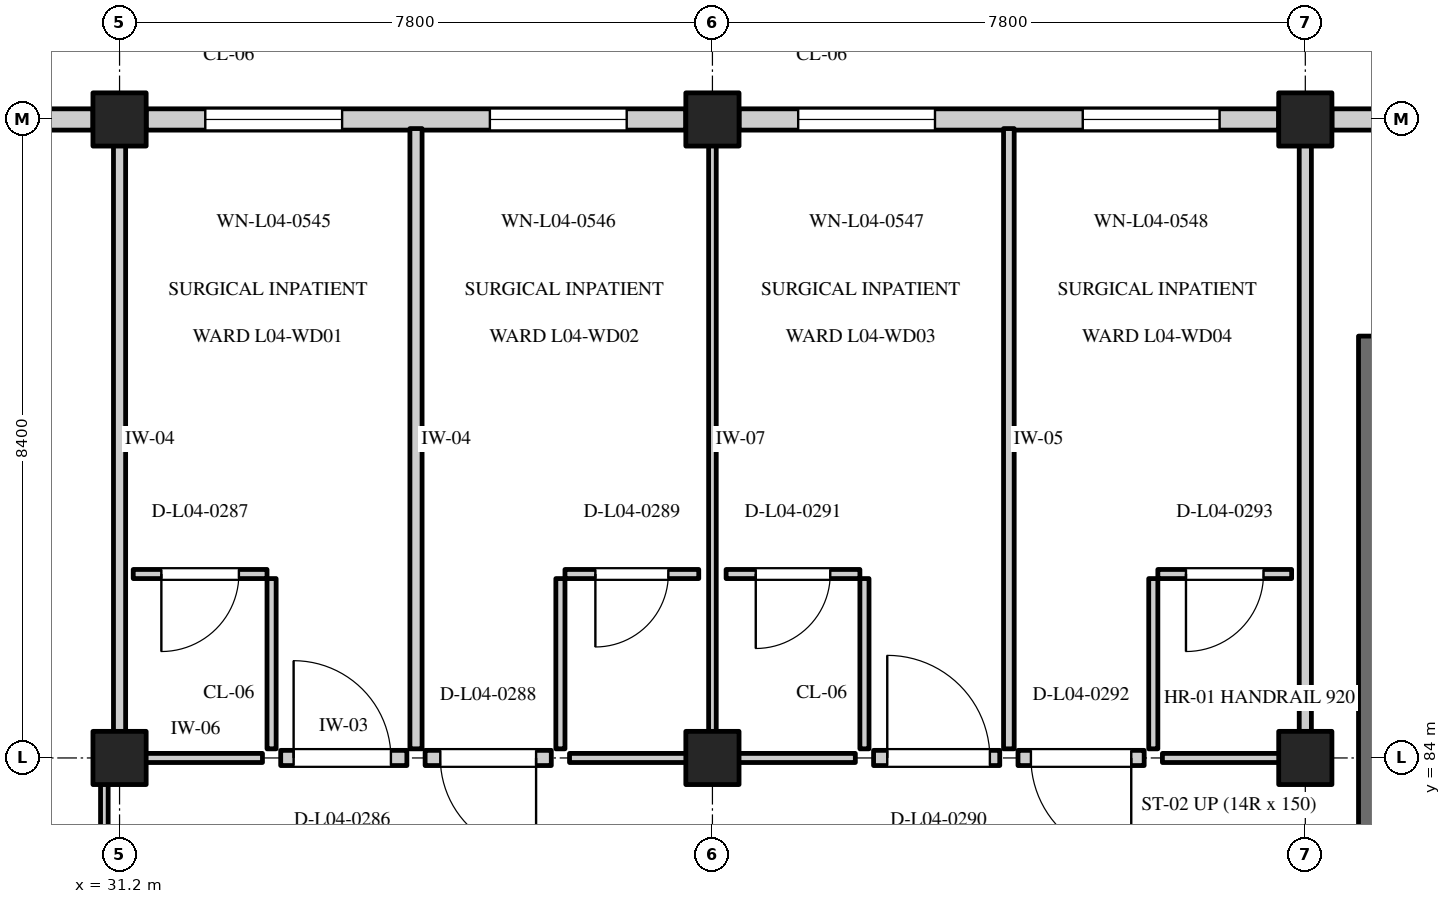
"""IFC4 building model, lengths in metres.
Left out: names, types, materials, properties, quantities, classifications, styles, units other than length and angle.
Written with IfcOpenShell. Run it as: python <this file> out.ifc"""

import sys

from ifc_helpers import new_model, si_unit, direction, frame, frame_2d, origin, origin_2d, place, context, subcontext, project, spatial, rectangle, extrude, element, fill, save


model = new_model("IFC4")
c1 = context("Model", 3, precision=1e-05, world=origin(), true_north=direction((0.0, 1.0)))
c2 = subcontext(c1, "Body", "Model", "MODEL_VIEW")
j1 = project(units=[si_unit("LENGTHUNIT", "METRE"), si_unit("PLANEANGLEUNIT", "RADIAN")], contexts=[c1])
p1 = place(None, origin())
s1 = spatial("IfcSite", under=j1, at=p1, CompositionType="ELEMENT")
p2 = place(p1, origin())
s2 = spatial("IfcBuilding", under=s1, at=p2, CompositionType="ELEMENT")
p3 = place(p2, frame((0.0, 0.0, 18.0)))
s3 = spatial("IfcBuildingStorey", under=s2, at=p3, CompositionType="ELEMENT", Elevation=18.0)
for number, where, z_axis, x_axis in (
    (1, (31.2, 84.0, 0.0), (0.0, 0.0, 1.0), (1.0, 0.0, 0.0)),
    (2, (31.2, 92.4, 0.0), (0.0, 0.0, 1.0), (1.0, 0.0, 0.0)),
    (3, (39.0, 84.0, 0.0), (0.0, 0.0, 1.0), (1.0, 0.0, 0.0)),
    (4, (39.0, 92.4, 0.0), (0.0, 0.0, 1.0), (1.0, 0.0, 0.0)),
    (5, (46.8, 84.0, 0.0), (0.0, 0.0, 1.0), (1.0, 0.0, 0.0)),
    (6, (46.8, 92.4, 0.0), (0.0, 0.0, 1.0), (1.0, 0.0, 0.0)),
):
    element("IfcColumn", number, at=place(p3, frame(where, z_axis=z_axis, x_axis=x_axis)), inside=s3, PredefinedType="COLUMN", context=c2, shape_type="SweptSolid", body=[
        extrude(rectangle(XDim=0.7, YDim=0.7, at=origin_2d()), origin(), (0.0, 0.0, 1.0), 4.2),
    ])
p4 = place(p3, frame((23.775, 92.4, 0.0), z_axis=(0.0, 0.0, 1.0), x_axis=(1.0, 0.0, 0.0)))
e7 = element("IfcWall", 7, at=p4, inside=s3, PredefinedType="STANDARD", context=c2, shape_type="SweptSolid", body=[
    extrude(rectangle(XDim=7.075, YDim=0.28, at=frame_2d((3.538, 0.0))), origin(), (0.0, 0.0, 1.0), 3.335),
])
p5 = place(p4, frame((0.653, 0.0, 0.8)))
e8 = element("IfcOpeningElement", 8, at=p5, cuts=e7, PredefinedType="OPENING", context=c2, shape_type="SweptSolid", body=[
    extrude(rectangle(XDim=2.0, YDim=1.45, at=frame_2d((1.0, 0.725))), frame((0.0, 0.152, 0.0), z_axis=(0.0, -1.0, 0.0), x_axis=(1.0, 0.0, 0.0)), (0.0, 0.0, 1.0), 0.304),
])
p6 = place(p4, frame((4.397, 0.0, 0.8)))
e9 = element("IfcOpeningElement", 9, at=p6, cuts=e7, PredefinedType="OPENING", context=c2, shape_type="SweptSolid", body=[
    extrude(rectangle(XDim=2.0, YDim=1.45, at=frame_2d((1.0, 0.725))), frame((0.0, 0.152, 0.0), z_axis=(0.0, -1.0, 0.0), x_axis=(1.0, 0.0, 0.0)), (0.0, 0.0, 1.0), 0.304),
])
p7 = place(p3, frame((31.55, 92.4, 0.0), z_axis=(0.0, 0.0, 1.0), x_axis=(1.0, 0.0, 0.0)))
e10 = element("IfcWall", 10, at=p7, inside=s3, PredefinedType="STANDARD", context=c2, shape_type="SweptSolid", body=[
    extrude(rectangle(XDim=7.1, YDim=0.28, at=frame_2d((3.55, 0.0))), origin(), (0.0, 0.0, 1.0), 3.335),
])
p8 = place(p7, frame((0.778, 0.0, 0.8)))
e11 = element("IfcOpeningElement", 11, at=p8, cuts=e10, PredefinedType="OPENING", context=c2, shape_type="SweptSolid", body=[
    extrude(rectangle(XDim=1.8, YDim=1.75, at=frame_2d((0.9, 0.875))), frame((0.0, 0.152, 0.0), z_axis=(0.0, -1.0, 0.0), x_axis=(1.0, 0.0, 0.0)), (0.0, 0.0, 1.0), 0.304),
])
p9 = place(p7, frame((4.522, 0.0, 0.8)))
e12 = element("IfcOpeningElement", 12, at=p9, cuts=e10, PredefinedType="OPENING", context=c2, shape_type="SweptSolid", body=[
    extrude(rectangle(XDim=1.8, YDim=1.75, at=frame_2d((0.9, 0.875))), frame((0.0, 0.152, 0.0), z_axis=(0.0, -1.0, 0.0), x_axis=(1.0, 0.0, 0.0)), (0.0, 0.0, 1.0), 0.304),
])
p10 = place(p3, frame((39.35, 92.4, 0.0), z_axis=(0.0, 0.0, 1.0), x_axis=(1.0, 0.0, 0.0)))
e13 = element("IfcWall", 13, at=p10, inside=s3, PredefinedType="STANDARD", context=c2, shape_type="SweptSolid", body=[
    extrude(rectangle(XDim=7.1, YDim=0.28, at=frame_2d((3.55, 0.0))), origin(), (0.0, 0.0, 1.0), 3.335),
])
p11 = place(p10, frame((0.778, 0.0, 0.8)))
e14 = element("IfcOpeningElement", 14, at=p11, cuts=e13, PredefinedType="OPENING", context=c2, shape_type="SweptSolid", body=[
    extrude(rectangle(XDim=1.8, YDim=1.65, at=frame_2d((0.9, 0.825))), frame((0.0, 0.152, 0.0), z_axis=(0.0, -1.0, 0.0), x_axis=(1.0, 0.0, 0.0)), (0.0, 0.0, 1.0), 0.304),
])
p12 = place(p10, frame((4.522, 0.0, 0.8)))
e15 = element("IfcOpeningElement", 15, at=p12, cuts=e13, PredefinedType="OPENING", context=c2, shape_type="SweptSolid", body=[
    extrude(rectangle(XDim=1.8, YDim=1.65, at=frame_2d((0.9, 0.825))), frame((0.0, 0.152, 0.0), z_axis=(0.0, -1.0, 0.0), x_axis=(1.0, 0.0, 0.0)), (0.0, 0.0, 1.0), 0.304),
])
p13 = place(p3, frame((47.15, 92.4, 0.0), z_axis=(0.0, 0.0, 1.0), x_axis=(1.0, 0.0, 0.0)))
e16 = element("IfcWall", 16, at=p13, inside=s3, PredefinedType="STANDARD", context=c2, shape_type="SweptSolid", body=[
    extrude(rectangle(XDim=7.075, YDim=0.28, at=frame_2d((3.538, 0.0))), origin(), (0.0, 0.0, 1.0), 3.335),
])
p14 = place(p13, frame((0.778, 0.0, 0.8)))
e17 = element("IfcOpeningElement", 17, at=p14, cuts=e16, PredefinedType="OPENING", context=c2, shape_type="SweptSolid", body=[
    extrude(rectangle(XDim=1.8, YDim=1.55, at=frame_2d((0.9, 0.775))), frame((0.0, 0.152, 0.0), z_axis=(0.0, -1.0, 0.0), x_axis=(1.0, 0.0, 0.0)), (0.0, 0.0, 1.0), 0.304),
])
p15 = place(p13, frame((4.522, 0.0, 0.8)))
e18 = element("IfcOpeningElement", 18, at=p15, cuts=e16, PredefinedType="OPENING", context=c2, shape_type="SweptSolid", body=[
    extrude(rectangle(XDim=1.8, YDim=1.55, at=frame_2d((0.9, 0.775))), frame((0.0, 0.152, 0.0), z_axis=(0.0, -1.0, 0.0), x_axis=(1.0, 0.0, 0.0)), (0.0, 0.0, 1.0), 0.304),
])
p16 = place(p3, frame((47.675, 79.05, 0.0), z_axis=(0.0, 0.0, 1.0), x_axis=(0.0, 1.0, 0.0)))
e19 = element("IfcWall", 19, at=p16, inside=s3, PredefinedType="SHEAR", context=c2, shape_type="SweptSolid", body=[
    extrude(rectangle(XDim=10.5, YDim=0.35, at=frame_2d((5.25, 0.0))), origin(), (0.0, 0.0, 1.0), 4.2),
])
for number, where, z_axis, x_axis in (
    (20, (31.2, 84.12, 0.0), (0.0, 0.0, 1.0), (0.0, 1.0, 0.0)),
    (21, (35.1, 84.12, 0.0), (0.0, 0.0, 1.0), (0.0, 1.0, 0.0)),
):
    element("IfcWall", number, at=place(p3, frame(where, z_axis=z_axis, x_axis=x_axis)), inside=s3, PredefinedType="PARTITIONING", context=c2, shape_type="SweptSolid", body=[
        extrude(rectangle(XDim=8.16, YDim=0.16, at=frame_2d((4.08, 0.0))), origin(), (0.0, 0.0, 1.0), 3.865),
    ])
p17 = place(p3, frame((33.32, 84.0, 0.0), z_axis=(0.0, 0.0, 1.0), x_axis=(1.0, 0.0, 0.0)))
e22 = element("IfcWall", 22, at=p17, inside=s3, PredefinedType="STANDARD", context=c2, shape_type="SweptSolid", body=[
    extrude(rectangle(XDim=1.66, YDim=0.2, at=frame_2d((0.83, 0.0))), origin(), (0.0, 0.0, 1.0), 3.235),
])
p18 = place(p17, frame((0.17, 0.0, 0.0)))
e23 = element("IfcOpeningElement", 23, at=p18, cuts=e22, PredefinedType="OPENING", context=c2, shape_type="SweptSolid", body=[
    extrude(rectangle(XDim=1.28, YDim=2.15, at=frame_2d((0.64, 1.075))), frame((0.0, 0.112, 0.0), z_axis=(0.0, -1.0, 0.0), x_axis=(1.0, 0.0, 0.0)), (0.0, 0.0, 1.0), 0.224),
])
p19 = place(p3, frame((31.32, 84.0, 0.0), z_axis=(0.0, 0.0, 1.0), x_axis=(1.0, 0.0, 0.0)))
e24 = element("IfcWall", 24, at=p19, inside=s3, PredefinedType="PARTITIONING", context=c2, shape_type="SweptSolid", body=[
    extrude(rectangle(XDim=1.76, YDim=0.12, at=frame_2d((0.88, 0.0))), origin(), (0.0, 0.0, 1.0), 3.235),
])
p20 = place(p3, frame((33.2, 84.12, 0.0), z_axis=(0.0, 0.0, 1.0), x_axis=(0.0, 1.0, 0.0)))
e25 = element("IfcWall", 25, at=p20, inside=s3, PredefinedType="PARTITIONING", context=c2, shape_type="SweptSolid", body=[
    extrude(rectangle(XDim=2.24, YDim=0.12, at=frame_2d((1.12, 0.0))), origin(), (0.0, 0.0, 1.0), 3.865),
])
p21 = place(p3, frame((31.38, 86.42, 0.0), z_axis=(0.0, 0.0, 1.0), x_axis=(1.0, 0.0, 0.0)))
e26 = element("IfcWall", 26, at=p21, inside=s3, PredefinedType="PARTITIONING", context=c2, shape_type="SweptSolid", body=[
    extrude(rectangle(XDim=1.76, YDim=0.12, at=frame_2d((0.88, 0.0))), origin(), (0.0, 0.0, 1.0), 3.865),
])
p22 = place(p21, frame((0.37, 0.0, 0.0)))
e27 = element("IfcOpeningElement", 27, at=p22, cuts=e26, PredefinedType="OPENING", context=c2, shape_type="SweptSolid", body=[
    extrude(rectangle(XDim=1.02, YDim=2.15, at=frame_2d((0.51, 1.075))), frame((0.0, 0.072, 0.0), z_axis=(0.0, -1.0, 0.0), x_axis=(1.0, 0.0, 0.0)), (0.0, 0.0, 1.0), 0.144),
])
p23 = place(p3, frame((39.0, 84.12, 0.0), z_axis=(0.0, 0.0, 1.0), x_axis=(0.0, 1.0, 0.0)))
e28 = element("IfcWall", 28, at=p23, inside=s3, PredefinedType="PARTITIONING", context=c2, shape_type="SweptSolid", body=[
    extrude(rectangle(XDim=8.16, YDim=0.1, at=frame_2d((4.08, 0.0))), origin(), (0.0, 0.0, 1.0), 3.235),
])
p24 = place(p3, frame((35.22, 84.0, 0.0), z_axis=(0.0, 0.0, 1.0), x_axis=(1.0, 0.0, 0.0)))
e29 = element("IfcWall", 29, at=p24, inside=s3, PredefinedType="STANDARD", context=c2, shape_type="SweptSolid", body=[
    extrude(rectangle(XDim=1.66, YDim=0.2, at=frame_2d((0.83, 0.0))), origin(), (0.0, 0.0, 1.0), 3.235),
])
p25 = place(p24, frame((0.2, 0.0, 0.0)))
e30 = element("IfcOpeningElement", 30, at=p25, cuts=e29, PredefinedType="OPENING", context=c2, shape_type="SweptSolid", body=[
    extrude(rectangle(XDim=1.26, YDim=2.1, at=frame_2d((0.63, 1.05))), frame((0.0, 0.112, 0.0), z_axis=(0.0, -1.0, 0.0), x_axis=(1.0, 0.0, 0.0)), (0.0, 0.0, 1.0), 0.224),
])
p26 = place(p3, frame((37.12, 84.0, 0.0), z_axis=(0.0, 0.0, 1.0), x_axis=(1.0, 0.0, 0.0)))
e31 = element("IfcWall", 31, at=p26, inside=s3, PredefinedType="PARTITIONING", context=c2, shape_type="SweptSolid", body=[
    extrude(rectangle(XDim=1.76, YDim=0.12, at=frame_2d((0.88, 0.0))), origin(), (0.0, 0.0, 1.0), 3.235),
])
p27 = place(p3, frame((37.0, 84.12, 0.0), z_axis=(0.0, 0.0, 1.0), x_axis=(0.0, 1.0, 0.0)))
e32 = element("IfcWall", 32, at=p27, inside=s3, PredefinedType="PARTITIONING", context=c2, shape_type="SweptSolid", body=[
    extrude(rectangle(XDim=2.24, YDim=0.12, at=frame_2d((1.12, 0.0))), origin(), (0.0, 0.0, 1.0), 3.865),
])
p28 = place(p3, frame((37.06, 86.42, 0.0), z_axis=(0.0, 0.0, 1.0), x_axis=(1.0, 0.0, 0.0)))
e33 = element("IfcWall", 33, at=p28, inside=s3, PredefinedType="PARTITIONING", context=c2, shape_type="SweptSolid", body=[
    extrude(rectangle(XDim=1.76, YDim=0.12, at=frame_2d((0.88, 0.0))), origin(), (0.0, 0.0, 1.0), 3.865),
])
p29 = place(p28, frame((0.4, 0.0, 0.0)))
e34 = element("IfcOpeningElement", 34, at=p29, cuts=e33, PredefinedType="OPENING", context=c2, shape_type="SweptSolid", body=[
    extrude(rectangle(XDim=0.96, YDim=2.12, at=frame_2d((0.48, 1.06))), frame((0.0, 0.072, 0.0), z_axis=(0.0, -1.0, 0.0), x_axis=(1.0, 0.0, 0.0)), (0.0, 0.0, 1.0), 0.144),
])
p30 = place(p3, frame((42.9, 84.12, 0.0), z_axis=(0.0, 0.0, 1.0), x_axis=(0.0, 1.0, 0.0)))
e35 = element("IfcWall", 35, at=p30, inside=s3, PredefinedType="PARTITIONING", context=c2, shape_type="SweptSolid", body=[
    extrude(rectangle(XDim=8.16, YDim=0.14, at=frame_2d((4.08, 0.0))), origin(), (0.0, 0.0, 1.0), 3.865),
])
p31 = place(p3, frame((41.12, 84.0, 0.0), z_axis=(0.0, 0.0, 1.0), x_axis=(1.0, 0.0, 0.0)))
e36 = element("IfcWall", 36, at=p31, inside=s3, PredefinedType="STANDARD", context=c2, shape_type="SweptSolid", body=[
    extrude(rectangle(XDim=1.66, YDim=0.2, at=frame_2d((0.83, 0.0))), origin(), (0.0, 0.0, 1.0), 3.235),
])
p32 = place(p31, frame((0.18, 0.0, 0.0)))
e37 = element("IfcOpeningElement", 37, at=p32, cuts=e36, PredefinedType="OPENING", context=c2, shape_type="SweptSolid", body=[
    extrude(rectangle(XDim=1.35, YDim=2.15, at=frame_2d((0.675, 1.075))), frame((0.0, 0.112, 0.0), z_axis=(0.0, -1.0, 0.0), x_axis=(1.0, 0.0, 0.0)), (0.0, 0.0, 1.0), 0.224),
])
p33 = place(p3, frame((39.12, 84.0, 0.0), z_axis=(0.0, 0.0, 1.0), x_axis=(1.0, 0.0, 0.0)))
e38 = element("IfcWall", 38, at=p33, inside=s3, PredefinedType="PARTITIONING", context=c2, shape_type="SweptSolid", body=[
    extrude(rectangle(XDim=1.76, YDim=0.12, at=frame_2d((0.88, 0.0))), origin(), (0.0, 0.0, 1.0), 3.235),
])
p34 = place(p3, frame((41.0, 84.12, 0.0), z_axis=(0.0, 0.0, 1.0), x_axis=(0.0, 1.0, 0.0)))
e39 = element("IfcWall", 39, at=p34, inside=s3, PredefinedType="PARTITIONING", context=c2, shape_type="SweptSolid", body=[
    extrude(rectangle(XDim=2.24, YDim=0.12, at=frame_2d((1.12, 0.0))), origin(), (0.0, 0.0, 1.0), 3.865),
])
p35 = place(p3, frame((39.18, 86.42, 0.0), z_axis=(0.0, 0.0, 1.0), x_axis=(1.0, 0.0, 0.0)))
e40 = element("IfcWall", 40, at=p35, inside=s3, PredefinedType="PARTITIONING", context=c2, shape_type="SweptSolid", body=[
    extrude(rectangle(XDim=1.76, YDim=0.12, at=frame_2d((0.88, 0.0))), origin(), (0.0, 0.0, 1.0), 3.865),
])
p36 = place(p35, frame((0.39, 0.0, 0.0)))
e41 = element("IfcOpeningElement", 41, at=p36, cuts=e40, PredefinedType="OPENING", context=c2, shape_type="SweptSolid", body=[
    extrude(rectangle(XDim=0.98, YDim=2.1, at=frame_2d((0.49, 1.05))), frame((0.0, 0.072, 0.0), z_axis=(0.0, -1.0, 0.0), x_axis=(1.0, 0.0, 0.0)), (0.0, 0.0, 1.0), 0.144),
])
p37 = place(p3, frame((46.8, 84.12, 0.0), z_axis=(0.0, 0.0, 1.0), x_axis=(0.0, 1.0, 0.0)))
e42 = element("IfcWall", 42, at=p37, inside=s3, PredefinedType="PARTITIONING", context=c2, shape_type="SweptSolid", body=[
    extrude(rectangle(XDim=8.16, YDim=0.16, at=frame_2d((4.08, 0.0))), origin(), (0.0, 0.0, 1.0), 3.865),
])
p38 = place(p3, frame((43.02, 84.0, 0.0), z_axis=(0.0, 0.0, 1.0), x_axis=(1.0, 0.0, 0.0)))
e43 = element("IfcWall", 43, at=p38, inside=s3, PredefinedType="STANDARD", context=c2, shape_type="SweptSolid", body=[
    extrude(rectangle(XDim=1.66, YDim=0.2, at=frame_2d((0.83, 0.0))), origin(), (0.0, 0.0, 1.0), 3.235),
])
p39 = place(p38, frame((0.17, 0.0, 0.0)))
e44 = element("IfcOpeningElement", 44, at=p39, cuts=e43, PredefinedType="OPENING", context=c2, shape_type="SweptSolid", body=[
    extrude(rectangle(XDim=1.32, YDim=2.2, at=frame_2d((0.66, 1.1))), frame((0.0, 0.112, 0.0), z_axis=(0.0, -1.0, 0.0), x_axis=(1.0, 0.0, 0.0)), (0.0, 0.0, 1.0), 0.224),
])
p40 = place(p3, frame((44.92, 84.0, 0.0), z_axis=(0.0, 0.0, 1.0), x_axis=(1.0, 0.0, 0.0)))
e45 = element("IfcWall", 45, at=p40, inside=s3, PredefinedType="PARTITIONING", context=c2, shape_type="SweptSolid", body=[
    extrude(rectangle(XDim=1.76, YDim=0.12, at=frame_2d((0.88, 0.0))), origin(), (0.0, 0.0, 1.0), 3.235),
])
p41 = place(p3, frame((44.8, 84.12, 0.0), z_axis=(0.0, 0.0, 1.0), x_axis=(0.0, 1.0, 0.0)))
e46 = element("IfcWall", 46, at=p41, inside=s3, PredefinedType="PARTITIONING", context=c2, shape_type="SweptSolid", body=[
    extrude(rectangle(XDim=2.24, YDim=0.12, at=frame_2d((1.12, 0.0))), origin(), (0.0, 0.0, 1.0), 3.865),
])
p42 = place(p3, frame((44.86, 86.42, 0.0), z_axis=(0.0, 0.0, 1.0), x_axis=(1.0, 0.0, 0.0)))
e47 = element("IfcWall", 47, at=p42, inside=s3, PredefinedType="PARTITIONING", context=c2, shape_type="SweptSolid", body=[
    extrude(rectangle(XDim=1.76, YDim=0.12, at=frame_2d((0.88, 0.0))), origin(), (0.0, 0.0, 1.0), 3.865),
])
p43 = place(p42, frame((0.37, 0.0, 0.0)))
e48 = element("IfcOpeningElement", 48, at=p43, cuts=e47, PredefinedType="OPENING", context=c2, shape_type="SweptSolid", body=[
    extrude(rectangle(XDim=1.02, YDim=2.15, at=frame_2d((0.51, 1.075))), frame((0.0, 0.072, 0.0), z_axis=(0.0, -1.0, 0.0), x_axis=(1.0, 0.0, 0.0)), (0.0, 0.0, 1.0), 0.144),
])
p44 = place(p3, frame((31.0, 75.885, 0.0), z_axis=(0.0, 0.0, 1.0), x_axis=(0.0, 1.0, 0.0)))
e49 = element("IfcWall", 49, at=p44, inside=s3, PredefinedType="PARTITIONING", context=c2, shape_type="SweptSolid", body=[
    extrude(rectangle(XDim=8.195, YDim=0.1, at=frame_2d((4.098, 0.0))), origin(), (0.0, 0.0, 1.0), 3.865),
])
p45 = place(p44, frame((2.348, 0.0, 0.0)))
e50 = element("IfcOpeningElement", 50, at=p45, cuts=e49, PredefinedType="OPENING", context=c2, shape_type="SweptSolid", body=[
    extrude(rectangle(XDim=1.4, YDim=2.25, at=frame_2d((0.7, 1.125))), frame((0.0, 0.062, 0.0), z_axis=(0.0, -1.0, 0.0), x_axis=(1.0, 0.0, 0.0)), (0.0, 0.0, 1.0), 0.124),
])
p46 = place(p8, origin())
e51 = element("IfcWindow", 51, at=p46, inside=s3, PartitioningType="DOUBLE_PANEL_VERTICAL", PredefinedType="WINDOW", context=c2, shape_type="SweptSolid", body=[
    extrude(rectangle(XDim=1.8, YDim=1.75, at=frame_2d((0.9, 0.875))), frame((0.0, 0.03, 0.0), z_axis=(0.0, -1.0, 0.0), x_axis=(1.0, 0.0, 0.0)), (0.0, 0.0, 1.0), 0.06),
])
fill(e11, e51)
p47 = place(p9, origin())
e52 = element("IfcWindow", 52, at=p47, inside=s3, PartitioningType="DOUBLE_PANEL_VERTICAL", PredefinedType="WINDOW", context=c2, shape_type="SweptSolid", body=[
    extrude(rectangle(XDim=1.8, YDim=1.75, at=frame_2d((0.9, 0.875))), frame((0.0, 0.03, 0.0), z_axis=(0.0, -1.0, 0.0), x_axis=(1.0, 0.0, 0.0)), (0.0, 0.0, 1.0), 0.06),
])
fill(e12, e52)
p48 = place(p11, origin())
e53 = element("IfcWindow", 53, at=p48, inside=s3, PartitioningType="DOUBLE_PANEL_VERTICAL", PredefinedType="WINDOW", context=c2, shape_type="SweptSolid", body=[
    extrude(rectangle(XDim=1.8, YDim=1.65, at=frame_2d((0.9, 0.825))), frame((0.0, 0.03, 0.0), z_axis=(0.0, -1.0, 0.0), x_axis=(1.0, 0.0, 0.0)), (0.0, 0.0, 1.0), 0.06),
])
fill(e14, e53)
p49 = place(p12, origin())
e54 = element("IfcWindow", 54, at=p49, inside=s3, PartitioningType="DOUBLE_PANEL_VERTICAL", PredefinedType="WINDOW", context=c2, shape_type="SweptSolid", body=[
    extrude(rectangle(XDim=1.8, YDim=1.65, at=frame_2d((0.9, 0.825))), frame((0.0, 0.03, 0.0), z_axis=(0.0, -1.0, 0.0), x_axis=(1.0, 0.0, 0.0)), (0.0, 0.0, 1.0), 0.06),
])
fill(e15, e54)
p50 = place(p18, origin())
e55 = element("IfcDoor", 55, at=p50, inside=s3, OperationType="SINGLE_SWING_LEFT", PredefinedType="DOOR", context=c2, shape_type="SweptSolid", body=[
    extrude(rectangle(XDim=1.28, YDim=2.15, at=frame_2d((0.64, 1.075))), frame((0.0, 0.025, 0.0), z_axis=(0.0, -1.0, 0.0), x_axis=(1.0, 0.0, 0.0)), (0.0, 0.0, 1.0), 0.05),
])
fill(e23, e55)
p51 = place(p22, frame((1.02, 0.0, 0.0), z_axis=(0.0, 0.0, 1.0), x_axis=(-1.0, 0.0, 0.0)))
e56 = element("IfcDoor", 56, at=p51, inside=s3, OperationType="SINGLE_SWING_RIGHT", PredefinedType="DOOR", context=c2, shape_type="SweptSolid", body=[
    extrude(rectangle(XDim=1.02, YDim=2.15, at=frame_2d((0.51, 1.075))), frame((0.0, 0.025, 0.0), z_axis=(0.0, -1.0, 0.0), x_axis=(1.0, 0.0, 0.0)), (0.0, 0.0, 1.0), 0.05),
])
fill(e27, e56)
p52 = place(p25, origin())
e57 = element("IfcDoor", 57, at=p52, inside=s3, OperationType="SINGLE_SWING_RIGHT", PredefinedType="DOOR", context=c2, shape_type="SweptSolid", body=[
    extrude(rectangle(XDim=1.26, YDim=2.1, at=frame_2d((0.63, 1.05))), frame((0.0, 0.025, 0.0), z_axis=(0.0, -1.0, 0.0), x_axis=(1.0, 0.0, 0.0)), (0.0, 0.0, 1.0), 0.05),
])
fill(e30, e57)
p53 = place(p29, frame((0.96, 0.0, 0.0), z_axis=(0.0, 0.0, 1.0), x_axis=(-1.0, 0.0, 0.0)))
e58 = element("IfcDoor", 58, at=p53, inside=s3, OperationType="SINGLE_SWING_RIGHT", PredefinedType="DOOR", context=c2, shape_type="SweptSolid", body=[
    extrude(rectangle(XDim=0.96, YDim=2.12, at=frame_2d((0.48, 1.06))), frame((0.0, 0.025, 0.0), z_axis=(0.0, -1.0, 0.0), x_axis=(1.0, 0.0, 0.0)), (0.0, 0.0, 1.0), 0.05),
])
fill(e34, e58)
p54 = place(p32, origin())
e59 = element("IfcDoor", 59, at=p54, inside=s3, OperationType="SINGLE_SWING_LEFT", PredefinedType="DOOR", context=c2, shape_type="SweptSolid", body=[
    extrude(rectangle(XDim=1.35, YDim=2.15, at=frame_2d((0.675, 1.075))), frame((0.0, 0.025, 0.0), z_axis=(0.0, -1.0, 0.0), x_axis=(1.0, 0.0, 0.0)), (0.0, 0.0, 1.0), 0.05),
])
fill(e37, e59)
p55 = place(p36, frame((0.98, 0.0, 0.0), z_axis=(0.0, 0.0, 1.0), x_axis=(-1.0, 0.0, 0.0)))
e60 = element("IfcDoor", 60, at=p55, inside=s3, OperationType="SINGLE_SWING_RIGHT", PredefinedType="DOOR", context=c2, shape_type="SweptSolid", body=[
    extrude(rectangle(XDim=0.98, YDim=2.1, at=frame_2d((0.49, 1.05))), frame((0.0, 0.025, 0.0), z_axis=(0.0, -1.0, 0.0), x_axis=(1.0, 0.0, 0.0)), (0.0, 0.0, 1.0), 0.05),
])
fill(e41, e60)
p56 = place(p39, origin())
e61 = element("IfcDoor", 61, at=p56, inside=s3, OperationType="SINGLE_SWING_RIGHT", PredefinedType="DOOR", context=c2, shape_type="SweptSolid", body=[
    extrude(rectangle(XDim=1.32, YDim=2.2, at=frame_2d((0.66, 1.1))), frame((0.0, 0.025, 0.0), z_axis=(0.0, -1.0, 0.0), x_axis=(1.0, 0.0, 0.0)), (0.0, 0.0, 1.0), 0.05),
])
fill(e44, e61)
p57 = place(p43, frame((1.02, 0.0, 0.0), z_axis=(0.0, 0.0, 1.0), x_axis=(-1.0, 0.0, 0.0)))
e62 = element("IfcDoor", 62, at=p57, inside=s3, OperationType="SINGLE_SWING_RIGHT", PredefinedType="DOOR", context=c2, shape_type="SweptSolid", body=[
    extrude(rectangle(XDim=1.02, YDim=2.15, at=frame_2d((0.51, 1.075))), frame((0.0, 0.025, 0.0), z_axis=(0.0, -1.0, 0.0), x_axis=(1.0, 0.0, 0.0)), (0.0, 0.0, 1.0), 0.05),
])
fill(e48, e62)
save(model, sys.argv[1])
